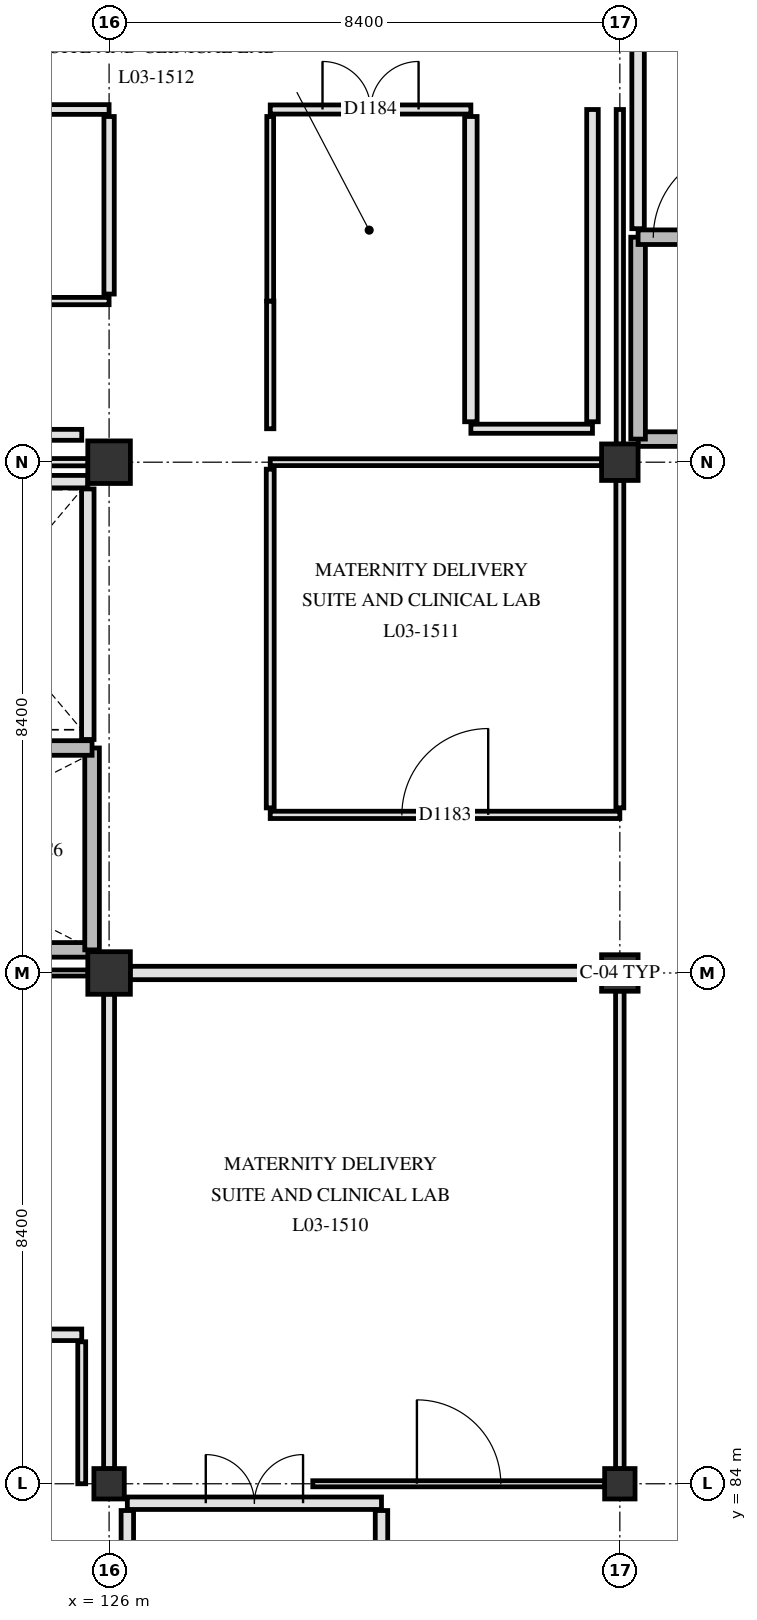
"""IFC4 building model, lengths in metres.
Left out: names, types, materials, properties, quantities, classifications, styles, units other than length and angle.
Written with IfcOpenShell. Run it as: python <this file> out.ifc"""

import sys

from ifc_helpers import new_model, si_unit, direction, frame, frame_2d, origin, origin_2d, place, context, subcontext, project, spatial, rectangle, extrude, element, fill, save


model = new_model("IFC4")
c1 = context("Model", 3, precision=1e-05, world=origin(), true_north=direction((0.0, 1.0)))
c2 = subcontext(c1, "Body", "Model", "MODEL_VIEW")
j1 = project(units=[si_unit("LENGTHUNIT", "METRE"), si_unit("PLANEANGLEUNIT", "RADIAN")], contexts=[c1])
p1 = place(None, origin())
s1 = spatial("IfcSite", under=j1, at=p1, CompositionType="ELEMENT")
p2 = place(p1, origin())
s2 = spatial("IfcBuilding", under=s1, at=p2, CompositionType="ELEMENT")
p3 = place(p2, frame((0.0, 0.0, 14.4)))
s3 = spatial("IfcBuildingStorey", under=s2, at=p3, CompositionType="ELEMENT", Elevation=14.4)
p4 = place(p3, frame((126.0, 84.0, 0.0), z_axis=(0.0, 0.0, 1.0), x_axis=(1.0, 0.0, 0.0)))
e1 = element("IfcColumn", 1, at=p4, inside=s3, PredefinedType="COLUMN", context=c2, shape_type="SweptSolid", body=[
    extrude(rectangle(XDim=0.5, YDim=0.5, at=origin_2d()), origin(), (0.0, 0.0, 1.0), 4.2),
])
for number, where, z_axis, x_axis in (
    (2, (126.0, 92.4, 0.0), (0.0, 0.0, 1.0), (1.0, 0.0, 0.0)),
    (3, (126.0, 100.8, 0.0), (0.0, 0.0, 1.0), (1.0, 0.0, 0.0)),
):
    element("IfcColumn", number, at=place(p3, frame(where, z_axis=z_axis, x_axis=x_axis)), inside=s3, PredefinedType="COLUMN", context=c2, shape_type="SweptSolid", body=[
        extrude(rectangle(XDim=0.7, YDim=0.7, at=origin_2d()), origin(), (0.0, 0.0, 1.0), 4.2),
    ])
p5 = place(p3, frame((134.4, 84.0, 0.0), z_axis=(0.0, 0.0, 1.0), x_axis=(1.0, 0.0, 0.0)))
e4 = element("IfcColumn", 4, at=p5, inside=s3, PredefinedType="COLUMN", context=c2, shape_type="SweptSolid", body=[
    extrude(rectangle(XDim=0.5, YDim=0.5, at=origin_2d()), origin(), (0.0, 0.0, 1.0), 4.2),
])
for number, where, z_axis, x_axis in (
    (5, (134.4, 92.4, 0.0), (0.0, 0.0, 1.0), (1.0, 0.0, 0.0)),
    (6, (134.4, 100.8, 0.0), (0.0, 0.0, 1.0), (1.0, 0.0, 0.0)),
):
    element("IfcColumn", number, at=place(p3, frame(where, z_axis=z_axis, x_axis=x_axis)), inside=s3, PredefinedType="COLUMN", context=c2, shape_type="SweptSolid", body=[
        extrude(rectangle(XDim=0.6, YDim=0.6, at=origin_2d()), origin(), (0.0, 0.0, 1.0), 4.2),
    ])
p6 = place(p3, frame((117.9, 92.78, 0.0), z_axis=(0.0, 0.0, 1.0), x_axis=(1.0, 0.0, 0.0)))
e7 = element("IfcWall", 7, at=p6, inside=s3, PredefinedType="SHEAR", context=c2, shape_type="SweptSolid", body=[
    extrude(rectangle(XDim=7.82, YDim=0.24, at=frame_2d((3.91, 0.0))), origin(), (0.0, 0.0, 1.0), 3.9),
])
p7 = place(p3, frame((125.72, 92.78, 0.0), z_axis=(0.0, 0.0, 1.0), x_axis=(0.0, 1.0, 0.0)))
e8 = element("IfcWall", 8, at=p7, inside=s3, PredefinedType="SHEAR", context=c2, shape_type="SweptSolid", body=[
    extrude(rectangle(XDim=3.32, YDim=0.24, at=frame_2d((1.66, 0.0))), origin(), (0.0, 0.0, 1.0), 3.9),
])
p8 = place(p3, frame((117.9, 96.1, 0.0), z_axis=(0.0, 0.0, 1.0), x_axis=(1.0, 0.0, 0.0)))
e9 = element("IfcWall", 9, at=p8, inside=s3, PredefinedType="SHEAR", context=c2, shape_type="SweptSolid", body=[
    extrude(rectangle(XDim=7.82, YDim=0.24, at=frame_2d((3.91, 0.0))), origin(), (0.0, 0.0, 1.0), 3.9),
])
p9 = place(p8, frame((0.25, 0.0, 0.0)))
e10 = element("IfcOpeningElement", 10, at=p9, cuts=e9, PredefinedType="OPENING", context=c2, shape_type="SweptSolid", body=[
    extrude(rectangle(XDim=1.45, YDim=2.2, at=frame_2d((0.725, 1.1))), frame((0.0, 0.13, 0.0), z_axis=(0.0, -1.0, 0.0), x_axis=(1.0, 0.0, 0.0)), (0.0, 0.0, 1.0), 0.26),
])
p10 = place(p3, frame((125.65, 96.24, 0.0), z_axis=(0.0, 0.0, 1.0), x_axis=(0.0, 1.0, 0.0)))
e11 = element("IfcWall", 11, at=p10, inside=s3, PredefinedType="PARTITIONING", context=c2, shape_type="SweptSolid", body=[
    extrude(rectangle(XDim=4.12, YDim=0.205, at=frame_2d((2.06, 0.0))), origin(), (0.0, 0.0, 1.0), 2.69),
])
p11 = place(p3, frame((122.08, 100.48, 0.0), z_axis=(0.0, 0.0, 1.0), x_axis=(1.0, 0.0, 0.0)))
e12 = element("IfcWall", 12, at=p11, inside=s3, PredefinedType="PARTITIONING", context=c2, shape_type="SweptSolid", body=[
    extrude(rectangle(XDim=3.57, YDim=0.205, at=frame_2d((1.785, 0.0))), origin(), (0.0, 0.0, 1.0), 3.29),
])
p12 = place(p3, frame((134.7, 101.18, 0.0), z_axis=(0.0, 0.0, 1.0), x_axis=(1.0, 0.0, 0.0)))
e13 = element("IfcWall", 13, at=p12, inside=s3, PredefinedType="SHEAR", context=c2, shape_type="SweptSolid", body=[
    extrude(rectangle(XDim=7.82, YDim=0.24, at=frame_2d((3.91, 0.0))), origin(), (0.0, 0.0, 1.0), 3.9),
])
p13 = place(p3, frame((134.7, 101.18, 0.0), z_axis=(0.0, 0.0, 1.0), x_axis=(0.0, 1.0, 0.0)))
e14 = element("IfcWall", 14, at=p13, inside=s3, PredefinedType="SHEAR", context=c2, shape_type="SweptSolid", body=[
    extrude(rectangle(XDim=3.32, YDim=0.24, at=frame_2d((1.66, 0.0))), origin(), (0.0, 0.0, 1.0), 3.9),
])
p14 = place(p3, frame((134.7, 104.5, 0.0), z_axis=(0.0, 0.0, 1.0), x_axis=(1.0, 0.0, 0.0)))
e15 = element("IfcWall", 15, at=p14, inside=s3, PredefinedType="SHEAR", context=c2, shape_type="SweptSolid", body=[
    extrude(rectangle(XDim=7.82, YDim=0.24, at=frame_2d((3.91, 0.0))), origin(), (0.0, 0.0, 1.0), 3.9),
])
p15 = place(p14, frame((0.25, 0.0, 0.0)))
e16 = element("IfcOpeningElement", 16, at=p15, cuts=e15, PredefinedType="OPENING", context=c2, shape_type="SweptSolid", body=[
    extrude(rectangle(XDim=1.45, YDim=2.2, at=frame_2d((0.725, 1.1))), frame((0.0, 0.13, 0.0), z_axis=(0.0, -1.0, 0.0), x_axis=(1.0, 0.0, 0.0)), (0.0, 0.0, 1.0), 0.26),
])
p16 = place(p3, frame((134.7, 104.64, 0.0), z_axis=(0.0, 0.0, 1.0), x_axis=(0.0, 1.0, 0.0)))
e17 = element("IfcWall", 17, at=p16, inside=s3, PredefinedType="PARTITIONING", context=c2, shape_type="SweptSolid", body=[
    extrude(rectangle(XDim=4.12, YDim=0.205, at=frame_2d((2.06, 0.0))), origin(), (0.0, 0.0, 1.0), 3.34),
])
p17 = place(p3, frame((130.48, 79.44, 0.0), z_axis=(0.0, 0.0, 1.0), x_axis=(0.0, 1.0, 0.0)))
e18 = element("IfcWall", 18, at=p17, inside=s3, PredefinedType="PARTITIONING", context=c2, shape_type="SweptSolid", body=[
    extrude(rectangle(XDim=4.12, YDim=0.205, at=frame_2d((2.06, 0.0))), origin(), (0.0, 0.0, 1.0), 3.89),
])
p18 = place(p3, frame((126.3, 79.44, 0.0), z_axis=(0.0, 0.0, 1.0), x_axis=(0.0, 1.0, 0.0)))
e19 = element("IfcWall", 19, at=p18, inside=s3, PredefinedType="PARTITIONING", context=c2, shape_type="SweptSolid", body=[
    extrude(rectangle(XDim=4.12, YDim=0.205, at=frame_2d((2.06, 0.0))), origin(), (0.0, 0.0, 1.0), 2.69),
])
p19 = place(p3, frame((126.3, 83.68, 0.0), z_axis=(0.0, 0.0, 1.0), x_axis=(1.0, 0.0, 0.0)))
e20 = element("IfcWall", 20, at=p19, inside=s3, PredefinedType="PARTITIONING", context=c2, shape_type="SweptSolid", body=[
    extrude(rectangle(XDim=4.18, YDim=0.205, at=frame_2d((2.09, 0.0))), origin(), (0.0, 0.0, 1.0), 2.69),
])
p20 = place(p19, frame((1.29, 0.0, 0.0)))
e21 = element("IfcOpeningElement", 21, at=p20, cuts=e20, PredefinedType="OPENING", context=c2, shape_type="SweptSolid", body=[
    extrude(rectangle(XDim=1.6, YDim=2.25, at=frame_2d((0.8, 1.125))), frame((0.0, 0.113, 0.0), z_axis=(0.0, -1.0, 0.0), x_axis=(1.0, 0.0, 0.0)), (0.0, 0.0, 1.0), 0.225),
])
p21 = place(p3, frame((129.35, 84.0, 0.0), z_axis=(0.0, 0.0, 1.0), x_axis=(1.0, 0.0, 0.0)))
e22 = element("IfcWall", 22, at=p21, inside=s3, PredefinedType="PARTITIONING", context=c2, shape_type="SweptSolid", body=[
    extrude(rectangle(XDim=4.805, YDim=0.1, at=frame_2d((2.402, 0.0))), origin(), (0.0, 0.0, 1.0), 3.29),
])
p22 = place(p21, frame((1.712, 0.0, 0.0)))
e23 = element("IfcOpeningElement", 23, at=p22, cuts=e22, PredefinedType="OPENING", context=c2, shape_type="SweptSolid", body=[
    extrude(rectangle(XDim=1.38, YDim=2.22, at=frame_2d((0.69, 1.11))), frame((0.0, 0.06, 0.0), z_axis=(0.0, -1.0, 0.0), x_axis=(1.0, 0.0, 0.0)), (0.0, 0.0, 1.0), 0.12),
])
p23 = place(p3, frame((123.55, 86.45, 0.0), z_axis=(0.0, 0.0, 1.0), x_axis=(1.0, 0.0, 0.0)))
e24 = element("IfcWall", 24, at=p23, inside=s3, PredefinedType="PARTITIONING", context=c2, shape_type="SweptSolid", body=[
    extrude(rectangle(XDim=2.0, YDim=0.19, at=frame_2d((1.0, 0.0))), origin(), (0.0, 0.0, 1.0), 3.89),
])
p24 = place(p3, frame((117.945, 92.4, 0.0), z_axis=(0.0, 0.0, 1.0), x_axis=(1.0, 0.0, 0.0)))
e25 = element("IfcWall", 25, at=p24, inside=s3, PredefinedType="PARTITIONING", context=c2, shape_type="SweptSolid", body=[
    extrude(rectangle(XDim=7.71, YDim=0.1, at=frame_2d((3.855, 0.0))), origin(), (0.0, 0.0, 1.0), 2.89),
])
p25 = place(p3, frame((126.345, 92.4, 0.0), z_axis=(0.0, 0.0, 1.0), x_axis=(1.0, 0.0, 0.0)))
e26 = element("IfcWall", 26, at=p25, inside=s3, PredefinedType="PARTITIONING", context=c2, shape_type="SweptSolid", body=[
    extrude(rectangle(XDim=7.76, YDim=0.22, at=frame_2d((3.88, 0.0))), origin(), (0.0, 0.0, 1.0), 2.89),
])
p26 = place(p3, frame((128.65, 95.0, 0.0), z_axis=(0.0, 0.0, 1.0), x_axis=(1.0, 0.0, 0.0)))
e27 = element("IfcWall", 27, at=p26, inside=s3, PredefinedType="PARTITIONING", context=c2, shape_type="SweptSolid", body=[
    extrude(rectangle(XDim=5.75, YDim=0.12, at=frame_2d((2.875, 0.0))), origin(), (0.0, 0.0, 1.0), 3.34),
])
p27 = place(p26, frame((2.165, 0.0, 0.0)))
e28 = element("IfcOpeningElement", 28, at=p27, cuts=e27, PredefinedType="OPENING", context=c2, shape_type="SweptSolid", body=[
    extrude(rectangle(XDim=1.42, YDim=2.22, at=frame_2d((0.71, 1.11))), frame((0.0, 0.07, 0.0), z_axis=(0.0, -1.0, 0.0), x_axis=(1.0, 0.0, 0.0)), (0.0, 0.0, 1.0), 0.14),
])
p28 = place(p3, frame((120.95, 100.8, 0.0), z_axis=(0.0, 0.0, 1.0), x_axis=(1.0, 0.0, 0.0)))
e29 = element("IfcWall", 29, at=p28, inside=s3, PredefinedType="PARTITIONING", context=c2, shape_type="SweptSolid", body=[
    extrude(rectangle(XDim=4.705, YDim=0.12, at=frame_2d((2.353, 0.0))), origin(), (0.0, 0.0, 1.0), 3.29),
])
p29 = place(p3, frame((128.65, 100.8, 0.0), z_axis=(0.0, 0.0, 1.0), x_axis=(1.0, 0.0, 0.0)))
e30 = element("IfcWall", 30, at=p29, inside=s3, PredefinedType="PARTITIONING", context=c2, shape_type="SweptSolid", body=[
    extrude(rectangle(XDim=5.455, YDim=0.112, at=frame_2d((2.728, 0.0))), origin(), (0.0, 0.0, 1.0), 3.29),
])
p30 = place(p3, frame((120.95, 101.25, 0.0), z_axis=(0.0, 0.0, 1.0), x_axis=(1.0, 0.0, 0.0)))
e31 = element("IfcWall", 31, at=p30, inside=s3, PredefinedType="PARTITIONING", context=c2, shape_type="SweptSolid", body=[
    extrude(rectangle(XDim=4.6, YDim=0.18, at=frame_2d((2.3, 0.0))), origin(), (0.0, 0.0, 1.0), 3.89),
])
p31 = place(p3, frame((131.95, 101.35, 0.0), z_axis=(0.0, 0.0, 1.0), x_axis=(1.0, 0.0, 0.0)))
e32 = element("IfcWall", 32, at=p31, inside=s3, PredefinedType="PARTITIONING", context=c2, shape_type="SweptSolid", body=[
    extrude(rectangle(XDim=2.0, YDim=0.15, at=frame_2d((1.0, 0.0))), origin(), (0.0, 0.0, 1.0), 3.89),
])
p32 = place(p3, frame((118.15, 103.45, 0.0), z_axis=(0.0, 0.0, 1.0), x_axis=(1.0, 0.0, 0.0)))
e33 = element("IfcWall", 33, at=p32, inside=s3, PredefinedType="PARTITIONING", context=c2, shape_type="SweptSolid", body=[
    extrude(rectangle(XDim=7.85, YDim=0.12, at=frame_2d((3.925, 0.0))), origin(), (0.0, 0.0, 1.0), 2.69),
])
p33 = place(p32, frame((3.005, 0.0, 0.0)))
e34 = element("IfcOpeningElement", 34, at=p33, cuts=e33, PredefinedType="OPENING", context=c2, shape_type="SweptSolid", body=[
    extrude(rectangle(XDim=1.84, YDim=2.28, at=frame_2d((0.92, 1.14))), frame((0.0, 0.07, 0.0), z_axis=(0.0, -1.0, 0.0), x_axis=(1.0, 0.0, 0.0)), (0.0, 0.0, 1.0), 0.14),
])
p34 = place(p3, frame((117.6, 106.6, 0.0), z_axis=(0.0, 0.0, 1.0), x_axis=(1.0, 0.0, 0.0)))
e35 = element("IfcWall", 35, at=p34, inside=s3, PredefinedType="PARTITIONING", context=c2, shape_type="SweptSolid", body=[
    extrude(rectangle(XDim=8.4, YDim=0.16, at=frame_2d((4.2, 0.0))), origin(), (0.0, 0.0, 1.0), 2.69),
])
p35 = place(p3, frame((128.65, 106.6, 0.0), z_axis=(0.0, 0.0, 1.0), x_axis=(1.0, 0.0, 0.0)))
e36 = element("IfcWall", 36, at=p35, inside=s3, PredefinedType="PARTITIONING", context=c2, shape_type="SweptSolid", body=[
    extrude(rectangle(XDim=3.3, YDim=0.15, at=frame_2d((1.65, 0.0))), origin(), (0.0, 0.0, 1.0), 3.89),
])
p36 = place(p35, frame((0.86, 0.0, 0.0)))
e37 = element("IfcOpeningElement", 37, at=p36, cuts=e36, PredefinedType="OPENING", context=c2, shape_type="SweptSolid", body=[
    extrude(rectangle(XDim=1.58, YDim=2.22, at=frame_2d((0.79, 1.11))), frame((0.0, 0.085, 0.0), z_axis=(0.0, -1.0, 0.0), x_axis=(1.0, 0.0, 0.0)), (0.0, 0.0, 1.0), 0.17),
])
p37 = place(p3, frame((125.55, 84.0, 0.0), z_axis=(0.0, 0.0, 1.0), x_axis=(0.0, 1.0, 0.0)))
e38 = element("IfcWall", 38, at=p37, inside=s3, PredefinedType="PARTITIONING", context=c2, shape_type="SweptSolid", body=[
    extrude(rectangle(XDim=2.335, YDim=0.13, at=frame_2d((1.167, 0.0))), origin(), (0.0, 0.0, 1.0), 2.69),
])
p38 = place(p3, frame((126.0, 84.245, 0.0), z_axis=(0.0, 0.0, 1.0), x_axis=(0.0, 1.0, 0.0)))
e39 = element("IfcWall", 39, at=p38, inside=s3, PredefinedType="PARTITIONING", context=c2, shape_type="SweptSolid", body=[
    extrude(rectangle(XDim=7.81, YDim=0.18, at=frame_2d((3.905, 0.0))), origin(), (0.0, 0.0, 1.0), 2.69),
])
p39 = place(p3, frame((126.0, 103.565, 0.0), z_axis=(0.0, 0.0, 1.0), x_axis=(0.0, 1.0, 0.0)))
e40 = element("IfcWall", 40, at=p39, inside=s3, PredefinedType="PARTITIONING", context=c2, shape_type="SweptSolid", body=[
    extrude(rectangle(XDim=2.92, YDim=0.17, at=frame_2d((1.46, 0.0))), origin(), (0.0, 0.0, 1.0), 2.69),
])
p40 = place(p3, frame((128.65, 95.115, 0.0), z_axis=(0.0, 0.0, 1.0), x_axis=(0.0, 1.0, 0.0)))
e41 = element("IfcWall", 41, at=p40, inside=s3, PredefinedType="PARTITIONING", context=c2, shape_type="SweptSolid", body=[
    extrude(rectangle(XDim=5.57, YDim=0.13, at=frame_2d((2.785, 0.0))), origin(), (0.0, 0.0, 1.0), 3.29),
])
p41 = place(p3, frame((128.65, 101.35, 0.0), z_axis=(0.0, 0.0, 1.0), x_axis=(0.0, 1.0, 0.0)))
e42 = element("IfcWall", 42, at=p41, inside=s3, PredefinedType="PARTITIONING", context=c2, shape_type="SweptSolid", body=[
    extrude(rectangle(XDim=2.1, YDim=0.12, at=frame_2d((1.05, 0.0))), origin(), (0.0, 0.0, 1.0), 3.89),
])
p42 = place(p3, frame((128.65, 103.45, 0.0), z_axis=(0.0, 0.0, 1.0), x_axis=(0.0, 1.0, 0.0)))
e43 = element("IfcWall", 43, at=p42, inside=s3, PredefinedType="PARTITIONING", context=c2, shape_type="SweptSolid", body=[
    extrude(rectangle(XDim=3.035, YDim=0.112, at=frame_2d((1.518, 0.0))), origin(), (0.0, 0.0, 1.0), 3.89),
])
p43 = place(p3, frame((131.95, 101.465, 0.0), z_axis=(0.0, 0.0, 1.0), x_axis=(0.0, 1.0, 0.0)))
e44 = element("IfcWall", 44, at=p43, inside=s3, PredefinedType="PARTITIONING", context=c2, shape_type="SweptSolid", body=[
    extrude(rectangle(XDim=5.02, YDim=0.205, at=frame_2d((2.51, 0.0))), origin(), (0.0, 0.0, 1.0), 3.89),
])
p44 = place(p3, frame((133.95, 101.465, 0.0), z_axis=(0.0, 0.0, 1.0), x_axis=(0.0, 1.0, 0.0)))
e45 = element("IfcWall", 45, at=p44, inside=s3, PredefinedType="PARTITIONING", context=c2, shape_type="SweptSolid", body=[
    extrude(rectangle(XDim=5.135, YDim=0.19, at=frame_2d((2.567, 0.0))), origin(), (0.0, 0.0, 1.0), 3.89),
])
p45 = place(p3, frame((134.4, 84.245, 0.0), z_axis=(0.0, 0.0, 1.0), x_axis=(0.0, 1.0, 0.0)))
e46 = element("IfcWall", 46, at=p45, inside=s3, PredefinedType="PARTITIONING", context=c2, shape_type="SweptSolid", body=[
    extrude(rectangle(XDim=7.86, YDim=0.14, at=frame_2d((3.93, 0.0))), origin(), (0.0, 0.0, 1.0), 3.34),
])
p46 = place(p3, frame((134.4, 95.115, 0.0), z_axis=(0.0, 0.0, 1.0), x_axis=(0.0, 1.0, 0.0)))
e47 = element("IfcWall", 47, at=p46, inside=s3, PredefinedType="PARTITIONING", context=c2, shape_type="SweptSolid", body=[
    extrude(rectangle(XDim=5.39, YDim=0.13, at=frame_2d((2.695, 0.0))), origin(), (0.0, 0.0, 1.0), 3.34),
])
p47 = place(p3, frame((134.4, 101.095, 0.0), z_axis=(0.0, 0.0, 1.0), x_axis=(0.0, 1.0, 0.0)))
e48 = element("IfcWall", 48, at=p47, inside=s3, PredefinedType="PARTITIONING", context=c2, shape_type="SweptSolid", body=[
    extrude(rectangle(XDim=5.505, YDim=0.12, at=frame_2d((2.752, 0.0))), origin(), (0.0, 0.0, 1.0), 3.34),
])
p48 = place(p15, origin())
e49 = element("IfcDoor", 49, at=p48, inside=s3, OperationType="SINGLE_SWING_RIGHT", PredefinedType="DOOR", context=c2, shape_type="SweptSolid", body=[
    extrude(rectangle(XDim=1.45, YDim=2.2, at=frame_2d((0.725, 1.1))), frame((0.0, 0.025, 0.0), z_axis=(0.0, -1.0, 0.0), x_axis=(1.0, 0.0, 0.0)), (0.0, 0.0, 1.0), 0.05),
])
fill(e16, e49)
p49 = place(p20, origin())
e50 = element("IfcDoor", 50, at=p49, inside=s3, OperationType="DOUBLE_SWING_LEFT", PredefinedType="DOOR", context=c2, shape_type="SweptSolid", body=[
    extrude(rectangle(XDim=1.6, YDim=2.25, at=frame_2d((0.8, 1.125))), frame((0.0, 0.025, 0.0), z_axis=(0.0, -1.0, 0.0), x_axis=(1.0, 0.0, 0.0)), (0.0, 0.0, 1.0), 0.05),
])
fill(e21, e50)
p50 = place(p22, origin())
e51 = element("IfcDoor", 51, at=p50, inside=s3, OperationType="SINGLE_SWING_LEFT", PredefinedType="DOOR", context=c2, shape_type="SweptSolid", body=[
    extrude(rectangle(XDim=1.38, YDim=2.22, at=frame_2d((0.69, 1.11))), frame((0.0, 0.025, 0.0), z_axis=(0.0, -1.0, 0.0), x_axis=(1.0, 0.0, 0.0)), (0.0, 0.0, 1.0), 0.05),
])
fill(e23, e51)
p51 = place(p27, origin())
e52 = element("IfcDoor", 52, at=p51, inside=s3, OperationType="SINGLE_SWING_RIGHT", PredefinedType="DOOR", context=c2, shape_type="SweptSolid", body=[
    extrude(rectangle(XDim=1.42, YDim=2.22, at=frame_2d((0.71, 1.11))), frame((0.0, 0.025, 0.0), z_axis=(0.0, -1.0, 0.0), x_axis=(1.0, 0.0, 0.0)), (0.0, 0.0, 1.0), 0.05),
])
fill(e28, e52)
p52 = place(p36, origin())
e53 = element("IfcDoor", 53, at=p52, inside=s3, OperationType="DOUBLE_SWING_LEFT", PredefinedType="DOOR", context=c2, shape_type="SweptSolid", body=[
    extrude(rectangle(XDim=1.58, YDim=2.22, at=frame_2d((0.79, 1.11))), frame((0.0, 0.025, 0.0), z_axis=(0.0, -1.0, 0.0), x_axis=(1.0, 0.0, 0.0)), (0.0, 0.0, 1.0), 0.05),
])
fill(e37, e53)
save(model, sys.argv[1])
